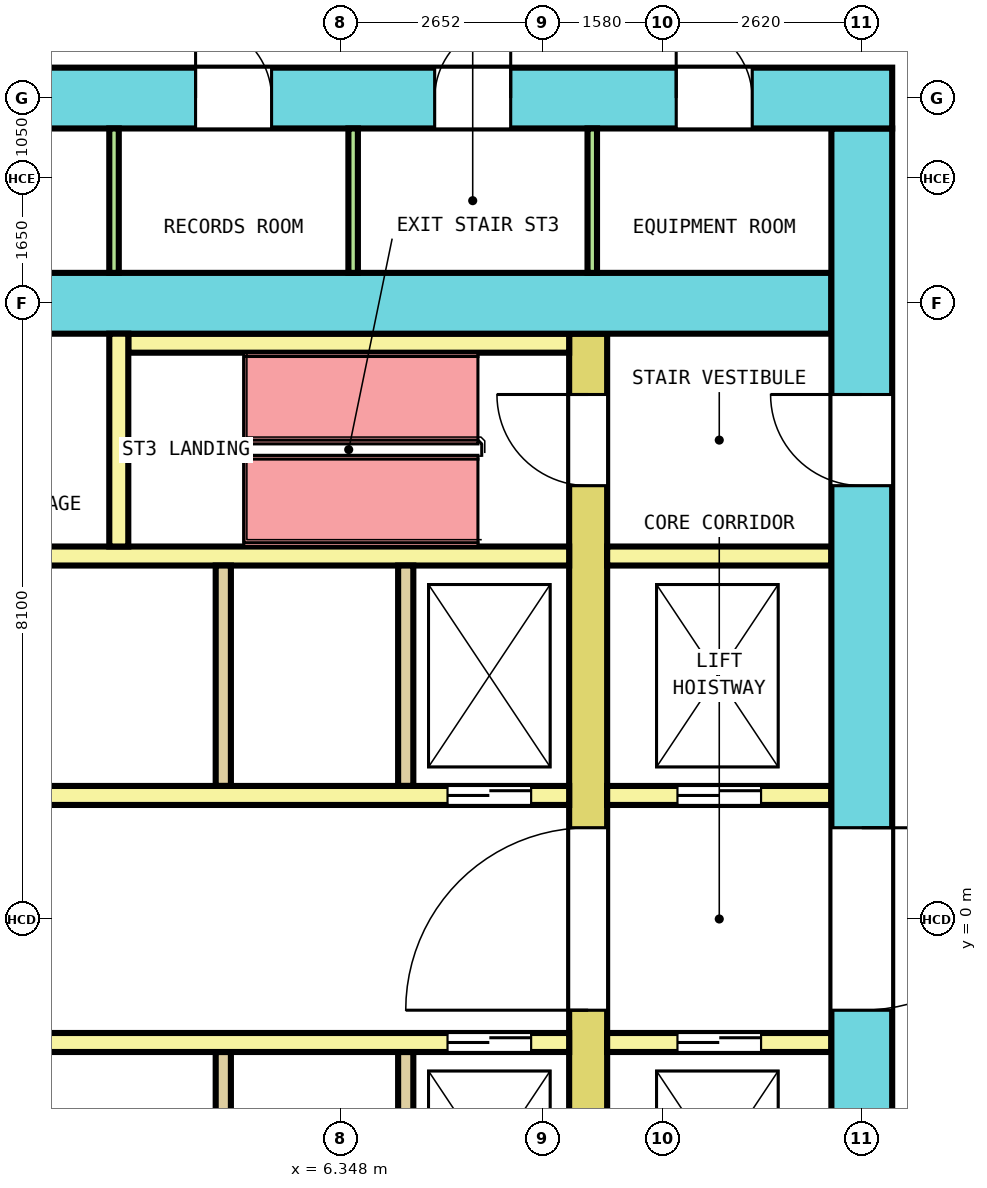
"""IFC4 building model, lengths in metres.
Left out: names, types, materials, properties, quantities, classifications, styles, units other than length and angle.
Written with IfcOpenShell. Run it as: python <this file> out.ifc"""

import sys

from ifc_helpers import new_model, si_unit, direction, frame, frame_2d, origin, place, context, subcontext, project, spatial, rectangle, extrude, element, fill, save


model = new_model("IFC4")
c1 = context("Model", 3, precision=1e-05, world=origin(), true_north=direction((0.0, 1.0)))
c2 = subcontext(c1, "Body", "Model", "MODEL_VIEW")
j1 = project(units=[si_unit("LENGTHUNIT", "METRE"), si_unit("PLANEANGLEUNIT", "RADIAN")], contexts=[c1])
p1 = place(None, origin())
s1 = spatial("IfcSite", under=j1, at=p1, CompositionType="ELEMENT")
p2 = place(p1, origin())
s2 = spatial("IfcBuilding", under=s1, at=p2, CompositionType="ELEMENT")
p3 = place(p2, frame((0.0, 0.0, 98.4)))
s3 = spatial("IfcBuildingStorey", under=s2, at=p3, CompositionType="ELEMENT", Elevation=98.4)
p4 = place(p3, frame((-13.6, 10.8, 0.0), z_axis=(0.0, 0.0, 1.0), x_axis=(1.0, 0.0, 0.0)))
e1 = element("IfcWall", 1, at=p4, inside=s3, PredefinedType="SHEAR", context=c2, shape_type="SweptSolid", body=[
    extrude(rectangle(XDim=27.2, YDim=0.8, at=frame_2d((13.6, 0.0))), origin(), (0.0, 0.0, 1.0), 4.1),
])
p5 = place(p4, frame((1.798, 0.0, 0.0)))
e2 = element("IfcOpeningElement", 2, at=p5, cuts=e1, PredefinedType="OPENING", context=c2, shape_type="SweptSolid", body=[
    extrude(rectangle(XDim=1.0, YDim=2.1, at=frame_2d((0.5, 1.05))), frame((0.0, 0.41, 0.0), z_axis=(0.0, -1.0, 0.0), x_axis=(1.0, 0.0, 0.0)), (0.0, 0.0, 1.0), 0.82),
])
p6 = place(p4, frame((4.889, 0.0, 0.0)))
e3 = element("IfcOpeningElement", 3, at=p6, cuts=e1, PredefinedType="OPENING", context=c2, shape_type="SweptSolid", body=[
    extrude(rectangle(XDim=1.0, YDim=2.1, at=frame_2d((0.5, 1.05))), frame((0.0, 0.41, 0.0), z_axis=(0.0, -1.0, 0.0), x_axis=(1.0, 0.0, 0.0)), (0.0, 0.0, 1.0), 0.82),
])
p7 = place(p4, frame((7.948, 0.0, 0.0)))
e4 = element("IfcOpeningElement", 4, at=p7, cuts=e1, PredefinedType="OPENING", context=c2, shape_type="SweptSolid", body=[
    extrude(rectangle(XDim=1.0, YDim=2.1, at=frame_2d((0.5, 1.05))), frame((0.0, 0.41, 0.0), z_axis=(0.0, -1.0, 0.0), x_axis=(1.0, 0.0, 0.0)), (0.0, 0.0, 1.0), 0.82),
])
p8 = place(p4, frame((11.008, 0.0, 0.0)))
e5 = element("IfcOpeningElement", 5, at=p8, cuts=e1, PredefinedType="OPENING", context=c2, shape_type="SweptSolid", body=[
    extrude(rectangle(XDim=1.0, YDim=2.1, at=frame_2d((0.5, 1.05))), frame((0.0, 0.41, 0.0), z_axis=(0.0, -1.0, 0.0), x_axis=(1.0, 0.0, 0.0)), (0.0, 0.0, 1.0), 0.82),
])
p9 = place(p4, frame((18.035, 0.0, 0.0)))
e6 = element("IfcOpeningElement", 6, at=p9, cuts=e1, PredefinedType="OPENING", context=c2, shape_type="SweptSolid", body=[
    extrude(rectangle(XDim=1.0, YDim=2.1, at=frame_2d((0.5, 1.05))), frame((0.0, 0.41, 0.0), z_axis=(0.0, -1.0, 0.0), x_axis=(1.0, 0.0, 0.0)), (0.0, 0.0, 1.0), 0.82),
])
p10 = place(p4, frame((21.181, 0.0, 0.0)))
e7 = element("IfcOpeningElement", 7, at=p10, cuts=e1, PredefinedType="OPENING", context=c2, shape_type="SweptSolid", body=[
    extrude(rectangle(XDim=1.0, YDim=2.1, at=frame_2d((0.5, 1.05))), frame((0.0, 0.41, 0.0), z_axis=(0.0, -1.0, 0.0), x_axis=(1.0, 0.0, 0.0)), (0.0, 0.0, 1.0), 0.82),
])
p11 = place(p4, frame((24.358, 0.0, 0.0)))
e8 = element("IfcOpeningElement", 8, at=p11, cuts=e1, PredefinedType="OPENING", context=c2, shape_type="SweptSolid", body=[
    extrude(rectangle(XDim=1.0, YDim=2.1, at=frame_2d((0.5, 1.05))), frame((0.0, 0.41, 0.0), z_axis=(0.0, -1.0, 0.0), x_axis=(1.0, 0.0, 0.0)), (0.0, 0.0, 1.0), 0.82),
])
p12 = place(p4, frame((14.525, 0.0, 0.0)))
e9 = element("IfcOpeningElement", 9, at=p12, cuts=e1, PredefinedType="OPENING", context=c2, shape_type="SweptSolid", body=[
    extrude(rectangle(XDim=1.4, YDim=2.1, at=frame_2d((0.7, 1.05))), frame((0.0, 0.41, 0.0), z_axis=(0.0, -1.0, 0.0), x_axis=(1.0, 0.0, 0.0)), (0.0, 0.0, 1.0), 0.82),
])
p13 = place(p3, frame((13.2, -10.4, 0.0), z_axis=(0.0, 0.0, 1.0), x_axis=(0.0, 1.0, 0.0)))
e10 = element("IfcWall", 10, at=p13, inside=s3, PredefinedType="SHEAR", context=c2, shape_type="SweptSolid", body=[
    extrude(rectangle(XDim=20.8, YDim=0.8, at=frame_2d((10.4, 0.0))), origin(), (0.0, 0.0, 1.0), 4.1),
])
p14 = place(p13, frame((9.2, 0.0, 0.0)))
e11 = element("IfcOpeningElement", 11, at=p14, cuts=e10, PredefinedType="OPENING", context=c2, shape_type="SweptSolid", body=[
    extrude(rectangle(XDim=2.4, YDim=2.1, at=frame_2d((1.2, 1.05))), frame((0.0, 0.41, 0.0), z_axis=(0.0, -1.0, 0.0), x_axis=(1.0, 0.0, 0.0)), (0.0, 0.0, 1.0), 0.82),
])
p15 = place(p13, frame((16.1, 0.0, 0.0)))
e12 = element("IfcOpeningElement", 12, at=p15, cuts=e10, PredefinedType="OPENING", context=c2, shape_type="SweptSolid", body=[
    extrude(rectangle(XDim=1.2, YDim=2.1, at=frame_2d((0.6, 1.05))), frame((0.0, 0.41, 0.0), z_axis=(0.0, -1.0, 0.0), x_axis=(1.0, 0.0, 0.0)), (0.0, 0.0, 1.0), 0.82),
])
p16 = place(p13, frame((3.6, 0.0, 0.0)))
e13 = element("IfcOpeningElement", 13, at=p16, cuts=e10, PredefinedType="OPENING", context=c2, shape_type="SweptSolid", body=[
    extrude(rectangle(XDim=1.0, YDim=2.1, at=frame_2d((0.5, 1.05))), frame((0.0, 0.41, 0.0), z_axis=(0.0, -1.0, 0.0), x_axis=(1.0, 0.0, 0.0)), (0.0, 0.0, 1.0), 0.82),
])
p17 = place(p3, frame((-12.8, 8.1, 0.0), z_axis=(0.0, 0.0, 1.0), x_axis=(1.0, 0.0, 0.0)))
e14 = element("IfcWall", 14, at=p17, inside=s3, PredefinedType="SHEAR", context=c2, shape_type="SweptSolid", body=[
    extrude(rectangle(XDim=25.6, YDim=0.8, at=frame_2d((12.8, 0.0))), origin(), (0.0, 0.0, 1.0), 4.1),
])
p18 = place(p17, frame((13.725, 0.0, 0.0)))
e15 = element("IfcOpeningElement", 15, at=p18, cuts=e14, PredefinedType="OPENING", context=c2, shape_type="SweptSolid", body=[
    extrude(rectangle(XDim=1.4, YDim=2.1, at=frame_2d((0.7, 1.05))), frame((0.0, 0.41, 0.0), z_axis=(0.0, -1.0, 0.0), x_axis=(1.0, 0.0, 0.0)), (0.0, 0.0, 1.0), 0.82),
])
p19 = place(p3, frame((9.6, -7.7, 0.0), z_axis=(0.0, 0.0, 1.0), x_axis=(0.0, 1.0, 0.0)))
e16 = element("IfcWall", 16, at=p19, inside=s3, PredefinedType="SHEAR", context=c2, shape_type="SweptSolid", body=[
    extrude(rectangle(XDim=15.4, YDim=0.5, at=frame_2d((7.7, 0.0))), origin(), (0.0, 0.0, 1.0), 4.1),
])
p20 = place(p19, frame((6.5, 0.0, 0.0)))
e17 = element("IfcOpeningElement", 17, at=p20, cuts=e16, PredefinedType="OPENING", context=c2, shape_type="SweptSolid", body=[
    extrude(rectangle(XDim=2.4, YDim=2.1, at=frame_2d((1.2, 1.05))), frame((0.0, 0.26, 0.0), z_axis=(0.0, -1.0, 0.0), x_axis=(1.0, 0.0, 0.0)), (0.0, 0.0, 1.0), 0.52),
])
p21 = place(p19, frame((13.4, 0.0, 0.0)))
e18 = element("IfcOpeningElement", 18, at=p21, cuts=e16, PredefinedType="OPENING", context=c2, shape_type="SweptSolid", body=[
    extrude(rectangle(XDim=1.2, YDim=2.1, at=frame_2d((0.6, 1.05))), frame((0.0, 0.26, 0.0), z_axis=(0.0, -1.0, 0.0), x_axis=(1.0, 0.0, 0.0)), (0.0, 0.0, 1.0), 0.52),
])
p22 = place(p19, frame((0.9, 0.0, 0.0)))
e19 = element("IfcOpeningElement", 19, at=p22, cuts=e16, PredefinedType="OPENING", context=c2, shape_type="SweptSolid", body=[
    extrude(rectangle(XDim=1.0, YDim=2.1, at=frame_2d((0.5, 1.05))), frame((0.0, 0.26, 0.0), z_axis=(0.0, -1.0, 0.0), x_axis=(1.0, 0.0, 0.0)), (0.0, 0.0, 1.0), 0.52),
])
p23 = place(p3, frame((-9.35, 1.625, 0.0), z_axis=(0.0, 0.0, 1.0), x_axis=(1.0, 0.0, 0.0)))
e20 = element("IfcWall", 20, at=p23, inside=s3, PredefinedType="SOLIDWALL", context=c2, shape_type="SweptSolid", body=[
    extrude(rectangle(XDim=18.7, YDim=0.25, at=frame_2d((9.35, 0.0))), origin(), (0.0, 0.0, 1.0), 4.1),
])
p24 = place(p23, frame((0.5, 0.0, 0.0)))
e21 = element("IfcOpeningElement", 21, at=p24, cuts=e20, PredefinedType="OPENING", context=c2, shape_type="SweptSolid", body=[
    extrude(rectangle(XDim=1.1, YDim=2.1, at=frame_2d((0.55, 1.05))), frame((0.0, 0.135, 0.0), z_axis=(0.0, -1.0, 0.0), x_axis=(1.0, 0.0, 0.0)), (0.0, 0.0, 1.0), 0.27),
])
p25 = place(p23, frame((17.1, 0.0, 0.0)))
e22 = element("IfcOpeningElement", 22, at=p25, cuts=e20, PredefinedType="OPENING", context=c2, shape_type="SweptSolid", body=[
    extrude(rectangle(XDim=1.1, YDim=2.1, at=frame_2d((0.55, 1.05))), frame((0.0, 0.135, 0.0), z_axis=(0.0, -1.0, 0.0), x_axis=(1.0, 0.0, 0.0)), (0.0, 0.0, 1.0), 0.27),
])
p26 = place(p3, frame((9.85, 1.625, 0.0), z_axis=(0.0, 0.0, 1.0), x_axis=(1.0, 0.0, 0.0)))
e23 = element("IfcWall", 23, at=p26, inside=s3, PredefinedType="SOLIDWALL", context=c2, shape_type="SweptSolid", body=[
    extrude(rectangle(XDim=2.95, YDim=0.25, at=frame_2d((1.475, 0.0))), origin(), (0.0, 0.0, 1.0), 4.1),
])
p27 = place(p26, frame((0.925, 0.0, 0.0)))
e24 = element("IfcOpeningElement", 24, at=p27, cuts=e23, PredefinedType="OPENING", context=c2, shape_type="SweptSolid", body=[
    extrude(rectangle(XDim=1.1, YDim=2.1, at=frame_2d((0.55, 1.05))), frame((0.0, 0.135, 0.0), z_axis=(0.0, -1.0, 0.0), x_axis=(1.0, 0.0, 0.0)), (0.0, 0.0, 1.0), 0.27),
])
p28 = place(p3, frame((-9.35, 4.775, 0.0), z_axis=(0.0, 0.0, 1.0), x_axis=(1.0, 0.0, 0.0)))
e25 = element("IfcWall", 25, at=p28, inside=s3, PredefinedType="SOLIDWALL", context=c2, shape_type="SweptSolid", body=[
    extrude(rectangle(XDim=18.7, YDim=0.25, at=frame_2d((9.35, 0.0))), origin(), (0.0, 0.0, 1.0), 4.1),
])
p29 = place(p3, frame((9.85, 4.775, 0.0), z_axis=(0.0, 0.0, 1.0), x_axis=(1.0, 0.0, 0.0)))
e26 = element("IfcWall", 26, at=p29, inside=s3, PredefinedType="SOLIDWALL", context=c2, shape_type="SweptSolid", body=[
    extrude(rectangle(XDim=2.95, YDim=0.25, at=frame_2d((1.475, 0.0))), origin(), (0.0, 0.0, 1.0), 4.1),
])
for number, where, z_axis, x_axis in (
    (27, (4.8, 1.75, 0.0), (0.0, 0.0, 1.0), (0.0, 1.0, 0.0)),
    (28, (7.2, 1.75, 0.0), (0.0, 0.0, 1.0), (0.0, 1.0, 0.0)),
):
    element("IfcWall", number, at=place(p3, frame(where, z_axis=z_axis, x_axis=x_axis)), inside=s3, PredefinedType="SOLIDWALL", context=c2, shape_type="SweptSolid", body=[
        extrude(rectangle(XDim=2.9, YDim=0.2, at=frame_2d((1.45, 0.0))), origin(), (0.0, 0.0, 1.0), 4.1),
    ])
p30 = place(p3, frame((-9.35, -1.625, 0.0), z_axis=(0.0, 0.0, 1.0), x_axis=(1.0, 0.0, 0.0)))
e29 = element("IfcWall", 29, at=p30, inside=s3, PredefinedType="SOLIDWALL", context=c2, shape_type="SweptSolid", body=[
    extrude(rectangle(XDim=18.7, YDim=0.25, at=frame_2d((9.35, 0.0))), origin(), (0.0, 0.0, 1.0), 4.1),
])
p31 = place(p30, frame((0.5, 0.0, 0.0)))
e30 = element("IfcOpeningElement", 30, at=p31, cuts=e29, PredefinedType="OPENING", context=c2, shape_type="SweptSolid", body=[
    extrude(rectangle(XDim=1.1, YDim=2.1, at=frame_2d((0.55, 1.05))), frame((0.0, 0.135, 0.0), z_axis=(0.0, -1.0, 0.0), x_axis=(1.0, 0.0, 0.0)), (0.0, 0.0, 1.0), 0.27),
])
p32 = place(p30, frame((17.1, 0.0, 0.0)))
e31 = element("IfcOpeningElement", 31, at=p32, cuts=e29, PredefinedType="OPENING", context=c2, shape_type="SweptSolid", body=[
    extrude(rectangle(XDim=1.1, YDim=2.1, at=frame_2d((0.55, 1.05))), frame((0.0, 0.135, 0.0), z_axis=(0.0, -1.0, 0.0), x_axis=(1.0, 0.0, 0.0)), (0.0, 0.0, 1.0), 0.27),
])
p33 = place(p3, frame((9.85, -1.625, 0.0), z_axis=(0.0, 0.0, 1.0), x_axis=(1.0, 0.0, 0.0)))
e32 = element("IfcWall", 32, at=p33, inside=s3, PredefinedType="SOLIDWALL", context=c2, shape_type="SweptSolid", body=[
    extrude(rectangle(XDim=2.95, YDim=0.25, at=frame_2d((1.475, 0.0))), origin(), (0.0, 0.0, 1.0), 4.1),
])
p34 = place(p33, frame((0.925, 0.0, 0.0)))
e33 = element("IfcOpeningElement", 33, at=p34, cuts=e32, PredefinedType="OPENING", context=c2, shape_type="SweptSolid", body=[
    extrude(rectangle(XDim=1.1, YDim=2.1, at=frame_2d((0.55, 1.05))), frame((0.0, 0.135, 0.0), z_axis=(0.0, -1.0, 0.0), x_axis=(1.0, 0.0, 0.0)), (0.0, 0.0, 1.0), 0.27),
])
for number, where, z_axis, x_axis in (
    (34, (4.8, -4.65, 0.0), (0.0, 0.0, 1.0), (0.0, 1.0, 0.0)),
    (35, (7.2, -4.65, 0.0), (0.0, 0.0, 1.0), (0.0, 1.0, 0.0)),
):
    element("IfcWall", number, at=place(p3, frame(where, z_axis=z_axis, x_axis=x_axis)), inside=s3, PredefinedType="SOLIDWALL", context=c2, shape_type="SweptSolid", body=[
        extrude(rectangle(XDim=2.9, YDim=0.2, at=frame_2d((1.45, 0.0))), origin(), (0.0, 0.0, 1.0), 4.1),
    ])
p35 = place(p3, frame((3.55, 7.575, 0.0), z_axis=(0.0, 0.0, 1.0), x_axis=(1.0, 0.0, 0.0)))
e36 = element("IfcWall", 36, at=p35, inside=s3, PredefinedType="SOLIDWALL", context=c2, shape_type="SweptSolid", body=[
    extrude(rectangle(XDim=5.8, YDim=0.25, at=frame_2d((2.9, 0.0))), origin(), (0.0, 0.0, 1.0), 4.1),
])
p36 = place(p3, frame((3.425, 4.9, 0.0), z_axis=(0.0, 0.0, 1.0), x_axis=(0.0, 1.0, 0.0)))
e37 = element("IfcWall", 37, at=p36, inside=s3, PredefinedType="SOLIDWALL", context=c2, shape_type="SweptSolid", body=[
    extrude(rectangle(XDim=2.8, YDim=0.25, at=frame_2d((1.4, 0.0))), origin(), (0.0, 0.0, 1.0), 4.1),
])
for number, where, z_axis, x_axis in (
    (38, (3.363, 8.5, 0.0), (0.0, 0.0, 1.0), (0.0, 1.0, 0.0)),
    (39, (6.508, 8.5, 0.0), (0.0, 0.0, 1.0), (0.0, 1.0, 0.0)),
    (40, (9.654, 8.5, 0.0), (0.0, 0.0, 1.0), (0.0, 1.0, 0.0)),
):
    element("IfcWall", number, at=place(p3, frame(where, z_axis=z_axis, x_axis=x_axis)), inside=s3, PredefinedType="PARTITIONING", context=c2, shape_type="SweptSolid", body=[
        extrude(rectangle(XDim=1.9, YDim=0.125, at=frame_2d((0.95, 0.0))), origin(), (0.0, 0.0, 1.0), 4.1),
    ])
p37 = place(p25, origin())
e41 = element("IfcDoor", 41, at=p37, inside=s3, OperationType="DOUBLE_DOOR_SLIDING", PredefinedType="DOOR", context=c2, shape_type="SweptSolid", body=[
    extrude(rectangle(XDim=1.1, YDim=2.1, at=frame_2d((0.55, 1.05))), frame((0.0, 0.075, 0.0), z_axis=(0.0, -1.0, 0.0), x_axis=(1.0, 0.0, 0.0)), (0.0, 0.0, 1.0), 0.15),
])
fill(e22, e41)
p38 = place(p27, origin())
e42 = element("IfcDoor", 42, at=p38, inside=s3, OperationType="DOUBLE_DOOR_SLIDING", PredefinedType="DOOR", context=c2, shape_type="SweptSolid", body=[
    extrude(rectangle(XDim=1.1, YDim=2.1, at=frame_2d((0.55, 1.05))), frame((0.0, 0.075, 0.0), z_axis=(0.0, -1.0, 0.0), x_axis=(1.0, 0.0, 0.0)), (0.0, 0.0, 1.0), 0.15),
])
fill(e24, e42)
p39 = place(p32, origin())
e43 = element("IfcDoor", 43, at=p39, inside=s3, OperationType="DOUBLE_DOOR_SLIDING", PredefinedType="DOOR", context=c2, shape_type="SweptSolid", body=[
    extrude(rectangle(XDim=1.1, YDim=2.1, at=frame_2d((0.55, 1.05))), frame((0.0, 0.075, 0.0), z_axis=(0.0, -1.0, 0.0), x_axis=(1.0, 0.0, 0.0)), (0.0, 0.0, 1.0), 0.15),
])
fill(e31, e43)
p40 = place(p34, origin())
e44 = element("IfcDoor", 44, at=p40, inside=s3, OperationType="DOUBLE_DOOR_SLIDING", PredefinedType="DOOR", context=c2, shape_type="SweptSolid", body=[
    extrude(rectangle(XDim=1.1, YDim=2.1, at=frame_2d((0.55, 1.05))), frame((0.0, 0.075, 0.0), z_axis=(0.0, -1.0, 0.0), x_axis=(1.0, 0.0, 0.0)), (0.0, 0.0, 1.0), 0.15),
])
fill(e33, e44)
p41 = place(p20, origin())
e45 = element("IfcDoor", 45, at=p41, inside=s3, OperationType="DOUBLE_DOOR_SINGLE_SWING", PredefinedType="DOOR", context=c2, shape_type="SweptSolid", body=[
    extrude(rectangle(XDim=2.4, YDim=2.1, at=frame_2d((1.2, 1.05))), frame((0.0, 0.2, 0.0), z_axis=(0.0, -1.0, 0.0), x_axis=(1.0, 0.0, 0.0)), (0.0, 0.0, 1.0), 0.4),
])
fill(e17, e45)
p42 = place(p14, origin())
e46 = element("IfcDoor", 46, at=p42, inside=s3, OperationType="DOUBLE_DOOR_SINGLE_SWING", PredefinedType="DOOR", context=c2, shape_type="SweptSolid", body=[
    extrude(rectangle(XDim=2.4, YDim=2.1, at=frame_2d((1.2, 1.05))), frame((0.0, 0.3, 0.0), z_axis=(0.0, -1.0, 0.0), x_axis=(1.0, 0.0, 0.0)), (0.0, 0.0, 1.0), 0.6),
])
fill(e11, e46)
p43 = place(p21, origin())
e47 = element("IfcDoor", 47, at=p43, inside=s3, OperationType="SINGLE_SWING_RIGHT", PredefinedType="DOOR", context=c2, shape_type="SweptSolid", body=[
    extrude(rectangle(XDim=1.2, YDim=2.1, at=frame_2d((0.6, 1.05))), frame((0.0, 0.2, 0.0), z_axis=(0.0, -1.0, 0.0), x_axis=(1.0, 0.0, 0.0)), (0.0, 0.0, 1.0), 0.4),
])
fill(e18, e47)
p44 = place(p15, origin())
e48 = element("IfcDoor", 48, at=p44, inside=s3, OperationType="SINGLE_SWING_LEFT", PredefinedType="DOOR", context=c2, shape_type="SweptSolid", body=[
    extrude(rectangle(XDim=1.2, YDim=2.1, at=frame_2d((0.6, 1.05))), frame((0.0, 0.3, 0.0), z_axis=(0.0, -1.0, 0.0), x_axis=(1.0, 0.0, 0.0)), (0.0, 0.0, 1.0), 0.6),
])
fill(e12, e48)
p45 = place(p9, origin())
e49 = element("IfcDoor", 49, at=p45, inside=s3, OperationType="SINGLE_SWING_RIGHT", PredefinedType="DOOR", context=c2, shape_type="SweptSolid", body=[
    extrude(rectangle(XDim=1.0, YDim=2.1, at=frame_2d((0.5, 1.05))), frame((0.0, 0.3, 0.0), z_axis=(0.0, -1.0, 0.0), x_axis=(1.0, 0.0, 0.0)), (0.0, 0.0, 1.0), 0.6),
])
fill(e6, e49)
p46 = place(p10, origin())
e50 = element("IfcDoor", 50, at=p46, inside=s3, OperationType="SINGLE_SWING_LEFT", PredefinedType="DOOR", context=c2, shape_type="SweptSolid", body=[
    extrude(rectangle(XDim=1.0, YDim=2.1, at=frame_2d((0.5, 1.05))), frame((0.0, 0.3, 0.0), z_axis=(0.0, -1.0, 0.0), x_axis=(1.0, 0.0, 0.0)), (0.0, 0.0, 1.0), 0.6),
])
fill(e7, e50)
p47 = place(p11, origin())
e51 = element("IfcDoor", 51, at=p47, inside=s3, OperationType="SINGLE_SWING_RIGHT", PredefinedType="DOOR", context=c2, shape_type="SweptSolid", body=[
    extrude(rectangle(XDim=1.0, YDim=2.1, at=frame_2d((0.5, 1.05))), frame((0.0, 0.3, 0.0), z_axis=(0.0, -1.0, 0.0), x_axis=(1.0, 0.0, 0.0)), (0.0, 0.0, 1.0), 0.6),
])
fill(e8, e51)
save(model, sys.argv[1])
